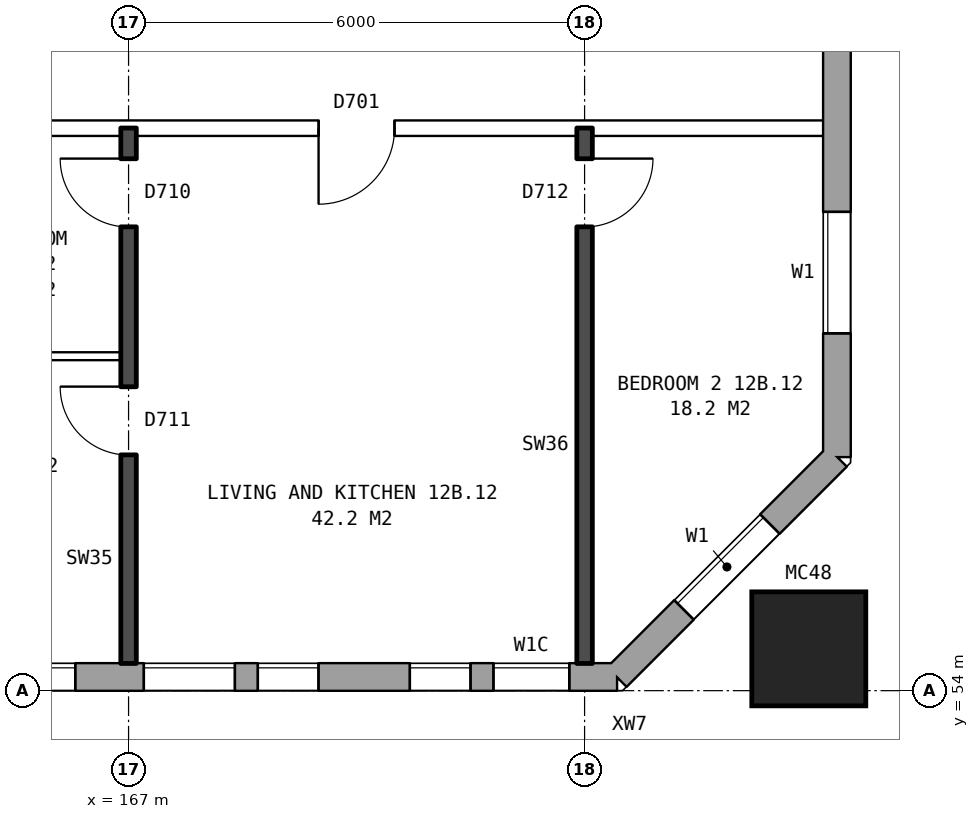
"""IFC4 building model, lengths in metres.
Left out: names, types, materials, properties, quantities, classifications, styles, units other than length and angle.
Written with IfcOpenShell. Run it as: python <this file> out.ifc"""

import sys

from ifc_helpers import new_model, si_unit, direction, frame, frame_2d, origin, origin_2d, place, context, subcontext, project, spatial, rectangle, hollow_rectangle, extrude, element, fill, save


model = new_model("IFC4")
c1 = context("Model", 3, precision=1e-05, world=origin(), true_north=direction((0.0, 1.0)))
c2 = subcontext(c1, "Body", "Model", "MODEL_VIEW")
j1 = project(units=[si_unit("LENGTHUNIT", "METRE"), si_unit("PLANEANGLEUNIT", "RADIAN")], contexts=[c1])
p1 = place(None, origin())
s1 = spatial("IfcSite", under=j1, at=p1, CompositionType="ELEMENT")
p2 = place(p1, origin())
s2 = spatial("IfcBuilding", under=s1, at=p2, CompositionType="ELEMENT")
p3 = place(p2, frame((0.0, 0.0, 47.4)))
s3 = spatial("IfcBuildingStorey", under=s2, at=p3, CompositionType="ELEMENT", Elevation=47.4)
p4 = place(p3, frame((175.95, 54.55, 0.0), z_axis=(0.0, 0.0, 1.0), x_axis=(1.0, 0.0, 0.0)))
e1 = element("IfcColumn", 1, at=p4, inside=s3, PredefinedType="COLUMN", context=c2, shape_type="SweptSolid", body=[
    extrude(hollow_rectangle(XDim=1.5, YDim=1.5, WallThickness=0.08, at=origin_2d()), origin(), (0.0, 0.0, 1.0), 3.1),
])
p5 = place(p3, frame((134.075, 54.18, 0.0), z_axis=(0.0, 0.0, 1.0), x_axis=(1.0, 0.0, 0.0)))
e2 = element("IfcWall", 2, at=p5, inside=s3, PredefinedType="STANDARD", context=c2, shape_type="SweptSolid", body=[
    extrude(rectangle(XDim=39.351, YDim=0.36, at=frame_2d((19.675, 0.0))), origin(), (0.0, 0.0, 1.0), 2.85),
])
p6 = place(p5, frame((0.3, 0.0, 0.8)))
e3 = element("IfcOpeningElement", 3, at=p6, cuts=e2, PredefinedType="OPENING", context=c2, shape_type="SweptSolid", body=[
    extrude(rectangle(XDim=1.2, YDim=1.8, at=frame_2d((0.6, 0.9))), frame((0.0, 0.19, 0.0), z_axis=(0.0, -1.0, 0.0), x_axis=(1.0, 0.0, 0.0)), (0.0, 0.0, 1.0), 0.38),
])
p7 = place(p5, frame((3.925, 0.0, 0.8)))
e4 = element("IfcOpeningElement", 4, at=p7, cuts=e2, PredefinedType="OPENING", context=c2, shape_type="SweptSolid", body=[
    extrude(rectangle(XDim=0.8, YDim=0.9, at=frame_2d((0.4, 0.45))), frame((0.0, 0.19, 0.0), z_axis=(0.0, -1.0, 0.0), x_axis=(1.0, 0.0, 0.0)), (0.0, 0.0, 1.0), 0.38),
])
p8 = place(p5, frame((6.625, 0.0, 0.8)))
e5 = element("IfcOpeningElement", 5, at=p8, cuts=e2, PredefinedType="OPENING", context=c2, shape_type="SweptSolid", body=[
    extrude(rectangle(XDim=1.6, YDim=1.8, at=frame_2d((0.8, 0.9))), frame((0.0, 0.19, 0.0), z_axis=(0.0, -1.0, 0.0), x_axis=(1.0, 0.0, 0.0)), (0.0, 0.0, 1.0), 0.38),
])
p9 = place(p5, frame((9.625, 0.0, 0.8)))
e6 = element("IfcOpeningElement", 6, at=p9, cuts=e2, PredefinedType="OPENING", context=c2, shape_type="SweptSolid", body=[
    extrude(rectangle(XDim=1.6, YDim=1.8, at=frame_2d((0.8, 0.9))), frame((0.0, 0.19, 0.0), z_axis=(0.0, -1.0, 0.0), x_axis=(1.0, 0.0, 0.0)), (0.0, 0.0, 1.0), 0.38),
])
p10 = place(p5, frame((12.625, 0.0, 0.8)))
e7 = element("IfcOpeningElement", 7, at=p10, cuts=e2, PredefinedType="OPENING", context=c2, shape_type="SweptSolid", body=[
    extrude(rectangle(XDim=1.6, YDim=1.8, at=frame_2d((0.8, 0.9))), frame((0.0, 0.19, 0.0), z_axis=(0.0, -1.0, 0.0), x_axis=(1.0, 0.0, 0.0)), (0.0, 0.0, 1.0), 0.38),
])
p11 = place(p5, frame((15.625, 0.0, 0.8)))
e8 = element("IfcOpeningElement", 8, at=p11, cuts=e2, PredefinedType="OPENING", context=c2, shape_type="SweptSolid", body=[
    extrude(rectangle(XDim=1.6, YDim=1.8, at=frame_2d((0.8, 0.9))), frame((0.0, 0.19, 0.0), z_axis=(0.0, -1.0, 0.0), x_axis=(1.0, 0.0, 0.0)), (0.0, 0.0, 1.0), 0.38),
])
p12 = place(p5, frame((18.625, 0.0, 0.8)))
e9 = element("IfcOpeningElement", 9, at=p12, cuts=e2, PredefinedType="OPENING", context=c2, shape_type="SweptSolid", body=[
    extrude(rectangle(XDim=1.6, YDim=1.8, at=frame_2d((0.8, 0.9))), frame((0.0, 0.19, 0.0), z_axis=(0.0, -1.0, 0.0), x_axis=(1.0, 0.0, 0.0)), (0.0, 0.0, 1.0), 0.38),
])
p13 = place(p5, frame((21.625, 0.0, 0.8)))
e10 = element("IfcOpeningElement", 10, at=p13, cuts=e2, PredefinedType="OPENING", context=c2, shape_type="SweptSolid", body=[
    extrude(rectangle(XDim=1.6, YDim=1.8, at=frame_2d((0.8, 0.9))), frame((0.0, 0.19, 0.0), z_axis=(0.0, -1.0, 0.0), x_axis=(1.0, 0.0, 0.0)), (0.0, 0.0, 1.0), 0.38),
])
p14 = place(p5, frame((24.625, 0.0, 0.8)))
e11 = element("IfcOpeningElement", 11, at=p14, cuts=e2, PredefinedType="OPENING", context=c2, shape_type="SweptSolid", body=[
    extrude(rectangle(XDim=1.6, YDim=1.8, at=frame_2d((0.8, 0.9))), frame((0.0, 0.19, 0.0), z_axis=(0.0, -1.0, 0.0), x_axis=(1.0, 0.0, 0.0)), (0.0, 0.0, 1.0), 0.38),
])
p15 = place(p5, frame((27.625, 0.0, 0.8)))
e12 = element("IfcOpeningElement", 12, at=p15, cuts=e2, PredefinedType="OPENING", context=c2, shape_type="SweptSolid", body=[
    extrude(rectangle(XDim=1.6, YDim=1.8, at=frame_2d((0.8, 0.9))), frame((0.0, 0.19, 0.0), z_axis=(0.0, -1.0, 0.0), x_axis=(1.0, 0.0, 0.0)), (0.0, 0.0, 1.0), 0.38),
])
p16 = place(p5, frame((30.625, 0.0, 0.8)))
e13 = element("IfcOpeningElement", 13, at=p16, cuts=e2, PredefinedType="OPENING", context=c2, shape_type="SweptSolid", body=[
    extrude(rectangle(XDim=1.6, YDim=1.8, at=frame_2d((0.8, 0.9))), frame((0.0, 0.19, 0.0), z_axis=(0.0, -1.0, 0.0), x_axis=(1.0, 0.0, 0.0)), (0.0, 0.0, 1.0), 0.38),
])
p17 = place(p5, frame((33.125, 0.0, 0.8)))
e14 = element("IfcOpeningElement", 14, at=p17, cuts=e2, PredefinedType="OPENING", context=c2, shape_type="SweptSolid", body=[
    extrude(rectangle(XDim=1.2, YDim=1.8, at=frame_2d((0.6, 0.9))), frame((0.0, 0.19, 0.0), z_axis=(0.0, -1.0, 0.0), x_axis=(1.0, 0.0, 0.0)), (0.0, 0.0, 1.0), 0.38),
])
p18 = place(p5, frame((34.625, 0.0, 0.8)))
e15 = element("IfcOpeningElement", 15, at=p18, cuts=e2, PredefinedType="OPENING", context=c2, shape_type="SweptSolid", body=[
    extrude(rectangle(XDim=0.8, YDim=0.9, at=frame_2d((0.4, 0.45))), frame((0.0, 0.19, 0.0), z_axis=(0.0, -1.0, 0.0), x_axis=(1.0, 0.0, 0.0)), (0.0, 0.0, 1.0), 0.38),
])
p19 = place(p5, frame((1.8, 0.0, 1.6)))
e16 = element("IfcOpeningElement", 16, at=p19, cuts=e2, PredefinedType="OPENING", context=c2, shape_type="SweptSolid", body=[
    extrude(rectangle(XDim=0.8, YDim=0.9, at=frame_2d((0.4, 0.45))), frame((0.0, 0.19, 0.0), z_axis=(0.0, -1.0, 0.0), x_axis=(1.0, 0.0, 0.0)), (0.0, 0.0, 1.0), 0.38),
])
p20 = place(p5, frame((5.025, 0.0, 0.8)))
e17 = element("IfcOpeningElement", 17, at=p20, cuts=e2, PredefinedType="OPENING", context=c2, shape_type="SweptSolid", body=[
    extrude(rectangle(XDim=1.2, YDim=1.8, at=frame_2d((0.6, 0.9))), frame((0.0, 0.19, 0.0), z_axis=(0.0, -1.0, 0.0), x_axis=(1.0, 0.0, 0.0)), (0.0, 0.0, 1.0), 0.38),
])
p21 = place(p5, frame((36.625, 0.0, 1.7)))
e18 = element("IfcOpeningElement", 18, at=p21, cuts=e2, PredefinedType="OPENING", context=c2, shape_type="SweptSolid", body=[
    extrude(rectangle(XDim=0.8, YDim=0.9, at=frame_2d((0.4, 0.45))), frame((0.0, 0.19, 0.0), z_axis=(0.0, -1.0, 0.0), x_axis=(1.0, 0.0, 0.0)), (0.0, 0.0, 1.0), 0.38),
])
p22 = place(p5, frame((37.725, 0.0, 0.8)))
e19 = element("IfcOpeningElement", 19, at=p22, cuts=e2, PredefinedType="OPENING", context=c2, shape_type="SweptSolid", body=[
    extrude(rectangle(XDim=1.0, YDim=1.8, at=frame_2d((0.5, 0.9))), frame((0.0, 0.19, 0.0), z_axis=(0.0, -1.0, 0.0), x_axis=(1.0, 0.0, 0.0)), (0.0, 0.0, 1.0), 0.38),
])
p23 = place(p3, frame((173.425, 54.18, 0.0), z_axis=(0.0, 0.0, 1.0), x_axis=(0.707106781187, 0.707106781187, 0.0)))
e20 = element("IfcWall", 20, at=p23, inside=s3, PredefinedType="STANDARD", context=c2, shape_type="SweptSolid", body=[
    extrude(rectangle(XDim=4.094, YDim=0.36, at=frame_2d((2.047, 0.0))), origin(), (0.0, 0.0, 1.0), 2.85),
])
p24 = place(p23, frame((1.247, 0.0, 0.8)))
e21 = element("IfcOpeningElement", 21, at=p24, cuts=e20, PredefinedType="OPENING", context=c2, shape_type="SweptSolid", body=[
    extrude(rectangle(XDim=1.6, YDim=1.8, at=frame_2d((0.8, 0.9))), frame((0.0, 0.19, 0.0), z_axis=(0.0, -1.0, 0.0), x_axis=(1.0, 0.0, 0.0)), (0.0, 0.0, 1.0), 0.38),
])
p25 = place(p3, frame((176.32, 57.075, 0.0), z_axis=(0.0, 0.0, 1.0), x_axis=(0.0, 1.0, 0.0)))
e22 = element("IfcWall", 22, at=p25, inside=s3, PredefinedType="STANDARD", context=c2, shape_type="SweptSolid", body=[
    extrude(rectangle(XDim=25.851, YDim=0.36, at=frame_2d((12.925, 0.0))), origin(), (0.0, 0.0, 1.0), 2.85),
])
p26 = place(p25, frame((1.625, 0.0, 0.8)))
e23 = element("IfcOpeningElement", 23, at=p26, cuts=e22, PredefinedType="OPENING", context=c2, shape_type="SweptSolid", body=[
    extrude(rectangle(XDim=1.6, YDim=1.8, at=frame_2d((0.8, 0.9))), frame((0.0, 0.19, 0.0), z_axis=(0.0, -1.0, 0.0), x_axis=(1.0, 0.0, 0.0)), (0.0, 0.0, 1.0), 0.38),
])
p27 = place(p25, frame((6.225, 0.0, 0.8)))
e24 = element("IfcOpeningElement", 24, at=p27, cuts=e22, PredefinedType="OPENING", context=c2, shape_type="SweptSolid", body=[
    extrude(rectangle(XDim=1.0, YDim=0.9, at=frame_2d((0.5, 0.45))), frame((0.0, 0.19, 0.0), z_axis=(0.0, -1.0, 0.0), x_axis=(1.0, 0.0, 0.0)), (0.0, 0.0, 1.0), 0.38),
])
p28 = place(p25, frame((7.625, 0.0, 0.8)))
e25 = element("IfcOpeningElement", 25, at=p28, cuts=e22, PredefinedType="OPENING", context=c2, shape_type="SweptSolid", body=[
    extrude(rectangle(XDim=1.6, YDim=1.8, at=frame_2d((0.8, 0.9))), frame((0.0, 0.19, 0.0), z_axis=(0.0, -1.0, 0.0), x_axis=(1.0, 0.0, 0.0)), (0.0, 0.0, 1.0), 0.38),
])
p29 = place(p25, frame((10.625, 0.0, 0.8)))
e26 = element("IfcOpeningElement", 26, at=p29, cuts=e22, PredefinedType="OPENING", context=c2, shape_type="SweptSolid", body=[
    extrude(rectangle(XDim=1.6, YDim=1.8, at=frame_2d((0.8, 0.9))), frame((0.0, 0.19, 0.0), z_axis=(0.0, -1.0, 0.0), x_axis=(1.0, 0.0, 0.0)), (0.0, 0.0, 1.0), 0.38),
])
p30 = place(p25, frame((13.625, 0.0, 0.8)))
e27 = element("IfcOpeningElement", 27, at=p30, cuts=e22, PredefinedType="OPENING", context=c2, shape_type="SweptSolid", body=[
    extrude(rectangle(XDim=1.6, YDim=1.8, at=frame_2d((0.8, 0.9))), frame((0.0, 0.19, 0.0), z_axis=(0.0, -1.0, 0.0), x_axis=(1.0, 0.0, 0.0)), (0.0, 0.0, 1.0), 0.38),
])
p31 = place(p25, frame((16.625, 0.0, 0.8)))
e28 = element("IfcOpeningElement", 28, at=p31, cuts=e22, PredefinedType="OPENING", context=c2, shape_type="SweptSolid", body=[
    extrude(rectangle(XDim=1.6, YDim=1.8, at=frame_2d((0.8, 0.9))), frame((0.0, 0.19, 0.0), z_axis=(0.0, -1.0, 0.0), x_axis=(1.0, 0.0, 0.0)), (0.0, 0.0, 1.0), 0.38),
])
p32 = place(p25, frame((9.525, 0.0, 0.8)))
e29 = element("IfcOpeningElement", 29, at=p32, cuts=e22, PredefinedType="OPENING", context=c2, shape_type="SweptSolid", body=[
    extrude(rectangle(XDim=0.8, YDim=1.8, at=frame_2d((0.4, 0.9))), frame((0.0, 0.19, 0.0), z_axis=(0.0, -1.0, 0.0), x_axis=(1.0, 0.0, 0.0)), (0.0, 0.0, 1.0), 0.38),
])
p33 = place(p25, frame((22.625, 0.0, 0.8)))
e30 = element("IfcOpeningElement", 30, at=p33, cuts=e22, PredefinedType="OPENING", context=c2, shape_type="SweptSolid", body=[
    extrude(rectangle(XDim=1.6, YDim=1.8, at=frame_2d((0.8, 0.9))), frame((0.0, 0.19, 0.0), z_axis=(0.0, -1.0, 0.0), x_axis=(1.0, 0.0, 0.0)), (0.0, 0.0, 1.0), 0.38),
])
p34 = place(p25, frame((12.525, 0.0, 0.8)))
e31 = element("IfcOpeningElement", 31, at=p34, cuts=e22, PredefinedType="OPENING", context=c2, shape_type="SweptSolid", body=[
    extrude(rectangle(XDim=0.8, YDim=1.8, at=frame_2d((0.4, 0.9))), frame((0.0, 0.19, 0.0), z_axis=(0.0, -1.0, 0.0), x_axis=(1.0, 0.0, 0.0)), (0.0, 0.0, 1.0), 0.38),
])
p35 = place(p25, frame((15.525, 0.0, 0.8)))
e32 = element("IfcOpeningElement", 32, at=p35, cuts=e22, PredefinedType="OPENING", context=c2, shape_type="SweptSolid", body=[
    extrude(rectangle(XDim=0.8, YDim=1.8, at=frame_2d((0.4, 0.9))), frame((0.0, 0.19, 0.0), z_axis=(0.0, -1.0, 0.0), x_axis=(1.0, 0.0, 0.0)), (0.0, 0.0, 1.0), 0.38),
])
p36 = place(p25, frame((18.525, 0.0, 0.8)))
e33 = element("IfcOpeningElement", 33, at=p36, cuts=e22, PredefinedType="OPENING", context=c2, shape_type="SweptSolid", body=[
    extrude(rectangle(XDim=1.0, YDim=0.9, at=frame_2d((0.5, 0.45))), frame((0.0, 0.19, 0.0), z_axis=(0.0, -1.0, 0.0), x_axis=(1.0, 0.0, 0.0)), (0.0, 0.0, 1.0), 0.38),
])
p37 = place(p3, frame((164.1, 58.4, 0.0), z_axis=(0.0, 0.0, 1.0), x_axis=(1.0, 0.0, 0.0)))
e34 = element("IfcWall", 34, at=p37, inside=s3, PredefinedType="PARTITIONING", context=c2, shape_type="SweptSolid", body=[
    extrude(rectangle(XDim=2.8, YDim=0.1, at=frame_2d((1.4, 0.0))), origin(), (0.0, 0.0, 1.0), 2.85),
])
p38 = place(p3, frame((155.1, 61.4, 0.0), z_axis=(0.0, 0.0, 1.0), x_axis=(1.0, 0.0, 0.0)))
e35 = element("IfcWall", 35, at=p38, inside=s3, PredefinedType="PARTITIONING", context=c2, shape_type="SweptSolid", body=[
    extrude(rectangle(XDim=21.04, YDim=0.2, at=frame_2d((10.52, 0.0))), origin(), (0.0, 0.0, 1.0), 2.85),
])
p39 = place(p38, frame((2.45, 0.0, 0.0)))
e36 = element("IfcOpeningElement", 36, at=p39, cuts=e35, PredefinedType="OPENING", context=c2, shape_type="SweptSolid", body=[
    extrude(rectangle(XDim=1.0, YDim=2.1, at=frame_2d((0.5, 1.05))), frame((0.0, 0.11, 0.0), z_axis=(0.0, -1.0, 0.0), x_axis=(1.0, 0.0, 0.0)), (0.0, 0.0, 1.0), 0.22),
])
p40 = place(p38, frame((14.4, 0.0, 0.0)))
e37 = element("IfcOpeningElement", 37, at=p40, cuts=e35, PredefinedType="OPENING", context=c2, shape_type="SweptSolid", body=[
    extrude(rectangle(XDim=1.0, YDim=2.1, at=frame_2d((0.5, 1.05))), frame((0.0, 0.11, 0.0), z_axis=(0.0, -1.0, 0.0), x_axis=(1.0, 0.0, 0.0)), (0.0, 0.0, 1.0), 0.22),
])
p41 = place(p3, frame((167.0, 54.36, 0.0), z_axis=(0.0, 0.0, 1.0), x_axis=(0.0, 1.0, 0.0)))
e38 = element("IfcWall", 38, at=p41, inside=s3, PredefinedType="SOLIDWALL", context=c2, shape_type="SweptSolid", body=[
    extrude(rectangle(XDim=7.04, YDim=0.2, at=frame_2d((3.52, 0.0))), origin(), (0.0, 0.0, 1.0), 2.85),
])
p42 = place(p41, frame((2.74, 0.0, 0.0)))
e39 = element("IfcOpeningElement", 39, at=p42, cuts=e38, PredefinedType="OPENING", context=c2, shape_type="SweptSolid", body=[
    extrude(rectangle(XDim=0.9, YDim=2.1, at=frame_2d((0.45, 1.05))), frame((0.0, 0.11, 0.0), z_axis=(0.0, -1.0, 0.0), x_axis=(1.0, 0.0, 0.0)), (0.0, 0.0, 1.0), 0.22),
])
p43 = place(p41, frame((5.74, 0.0, 0.0)))
e40 = element("IfcOpeningElement", 40, at=p43, cuts=e38, PredefinedType="OPENING", context=c2, shape_type="SweptSolid", body=[
    extrude(rectangle(XDim=0.9, YDim=2.1, at=frame_2d((0.45, 1.05))), frame((0.0, 0.11, 0.0), z_axis=(0.0, -1.0, 0.0), x_axis=(1.0, 0.0, 0.0)), (0.0, 0.0, 1.0), 0.22),
])
p44 = place(p3, frame((173.0, 54.36, 0.0), z_axis=(0.0, 0.0, 1.0), x_axis=(0.0, 1.0, 0.0)))
e41 = element("IfcWall", 41, at=p44, inside=s3, PredefinedType="SOLIDWALL", context=c2, shape_type="SweptSolid", body=[
    extrude(rectangle(XDim=7.04, YDim=0.2, at=frame_2d((3.52, 0.0))), origin(), (0.0, 0.0, 1.0), 2.85),
])
p45 = place(p44, frame((5.74, 0.0, 0.0)))
e42 = element("IfcOpeningElement", 42, at=p45, cuts=e41, PredefinedType="OPENING", context=c2, shape_type="SweptSolid", body=[
    extrude(rectangle(XDim=0.9, YDim=2.1, at=frame_2d((0.45, 1.05))), frame((0.0, 0.11, 0.0), z_axis=(0.0, -1.0, 0.0), x_axis=(1.0, 0.0, 0.0)), (0.0, 0.0, 1.0), 0.22),
])
p46 = place(p16, origin())
e43 = element("IfcWindow", 43, at=p46, inside=s3, PartitioningType="SINGLE_PANEL", PredefinedType="WINDOW", context=c2, shape_type="SweptSolid", body=[
    extrude(rectangle(XDim=1.6, YDim=1.8, at=frame_2d((0.8, 0.9))), frame((0.0, 0.15, 0.0), z_axis=(0.0, -1.0, 0.0), x_axis=(1.0, 0.0, 0.0)), (0.0, 0.0, 1.0), 0.06),
])
fill(e13, e43)
p47 = place(p17, origin())
e44 = element("IfcWindow", 44, at=p47, inside=s3, PartitioningType="SINGLE_PANEL", PredefinedType="WINDOW", context=c2, shape_type="SweptSolid", body=[
    extrude(rectangle(XDim=1.2, YDim=1.8, at=frame_2d((0.6, 0.9))), frame((0.0, 0.15, 0.0), z_axis=(0.0, -1.0, 0.0), x_axis=(1.0, 0.0, 0.0)), (0.0, 0.0, 1.0), 0.06),
])
fill(e14, e44)
p48 = place(p18, origin())
e45 = element("IfcWindow", 45, at=p48, inside=s3, PartitioningType="SINGLE_PANEL", PredefinedType="WINDOW", context=c2, shape_type="SweptSolid", body=[
    extrude(rectangle(XDim=0.8, YDim=0.9, at=frame_2d((0.4, 0.45))), frame((0.0, 0.15, 0.0), z_axis=(0.0, -1.0, 0.0), x_axis=(1.0, 0.0, 0.0)), (0.0, 0.0, 1.0), 0.06),
])
fill(e15, e45)
p49 = place(p24, origin())
e46 = element("IfcWindow", 46, at=p49, inside=s3, PartitioningType="SINGLE_PANEL", PredefinedType="WINDOW", context=c2, shape_type="SweptSolid", body=[
    extrude(rectangle(XDim=1.6, YDim=1.8, at=frame_2d((0.8, 0.9))), frame((0.0, 0.15, 0.0), z_axis=(0.0, -1.0, 0.0), x_axis=(1.0, 0.0, 0.0)), (0.0, 0.0, 1.0), 0.06),
])
fill(e21, e46)
p50 = place(p26, origin())
e47 = element("IfcWindow", 47, at=p50, inside=s3, PartitioningType="SINGLE_PANEL", PredefinedType="WINDOW", context=c2, shape_type="SweptSolid", body=[
    extrude(rectangle(XDim=1.6, YDim=1.8, at=frame_2d((0.8, 0.9))), frame((0.0, 0.15, 0.0), z_axis=(0.0, -1.0, 0.0), x_axis=(1.0, 0.0, 0.0)), (0.0, 0.0, 1.0), 0.06),
])
fill(e23, e47)
p51 = place(p42, origin())
e48 = element("IfcDoor", 48, at=p51, inside=s3, OperationType="SINGLE_SWING_RIGHT", PredefinedType="DOOR", context=c2, shape_type="SweptSolid", body=[
    extrude(rectangle(XDim=0.9, YDim=2.1, at=frame_2d((0.45, 1.05))), frame((0.0, 0.025, 0.0), z_axis=(0.0, -1.0, 0.0), x_axis=(1.0, 0.0, 0.0)), (0.0, 0.0, 1.0), 0.05),
])
fill(e39, e48)
p52 = place(p45, frame((0.9, 0.0, 0.0), z_axis=(0.0, 0.0, 1.0), x_axis=(-1.0, 0.0, 0.0)))
e49 = element("IfcDoor", 49, at=p52, inside=s3, OperationType="SINGLE_SWING_LEFT", PredefinedType="DOOR", context=c2, shape_type="SweptSolid", body=[
    extrude(rectangle(XDim=0.9, YDim=2.1, at=frame_2d((0.45, 1.05))), frame((0.0, 0.025, 0.0), z_axis=(0.0, -1.0, 0.0), x_axis=(1.0, 0.0, 0.0)), (0.0, 0.0, 1.0), 0.05),
])
fill(e42, e49)
p53 = place(p40, frame((1.0, 0.0, 0.0), z_axis=(0.0, 0.0, 1.0), x_axis=(-1.0, 0.0, 0.0)))
e50 = element("IfcDoor", 50, at=p53, inside=s3, OperationType="SINGLE_SWING_RIGHT", PredefinedType="DOOR", context=c2, shape_type="SweptSolid", body=[
    extrude(rectangle(XDim=1.0, YDim=2.1, at=frame_2d((0.5, 1.05))), frame((0.0, 0.025, 0.0), z_axis=(0.0, -1.0, 0.0), x_axis=(1.0, 0.0, 0.0)), (0.0, 0.0, 1.0), 0.05),
])
fill(e37, e50)
p54 = place(p43, origin())
e51 = element("IfcDoor", 51, at=p54, inside=s3, OperationType="SINGLE_SWING_RIGHT", PredefinedType="DOOR", context=c2, shape_type="SweptSolid", body=[
    extrude(rectangle(XDim=0.9, YDim=2.1, at=frame_2d((0.45, 1.05))), frame((0.0, 0.025, 0.0), z_axis=(0.0, -1.0, 0.0), x_axis=(1.0, 0.0, 0.0)), (0.0, 0.0, 1.0), 0.05),
])
fill(e40, e51)
p55 = place(p21, origin())
e52 = element("IfcWindow", 52, at=p55, inside=s3, PartitioningType="SINGLE_PANEL", PredefinedType="WINDOW", context=c2, shape_type="SweptSolid", body=[
    extrude(rectangle(XDim=0.8, YDim=0.9, at=frame_2d((0.4, 0.45))), frame((0.0, 0.15, 0.0), z_axis=(0.0, -1.0, 0.0), x_axis=(1.0, 0.0, 0.0)), (0.0, 0.0, 1.0), 0.06),
])
fill(e18, e52)
p56 = place(p22, origin())
e53 = element("IfcWindow", 53, at=p56, inside=s3, PartitioningType="SINGLE_PANEL", PredefinedType="WINDOW", context=c2, shape_type="SweptSolid", body=[
    extrude(rectangle(XDim=1.0, YDim=1.8, at=frame_2d((0.5, 0.9))), frame((0.0, 0.15, 0.0), z_axis=(0.0, -1.0, 0.0), x_axis=(1.0, 0.0, 0.0)), (0.0, 0.0, 1.0), 0.06),
])
fill(e19, e53)
save(model, sys.argv[1])
